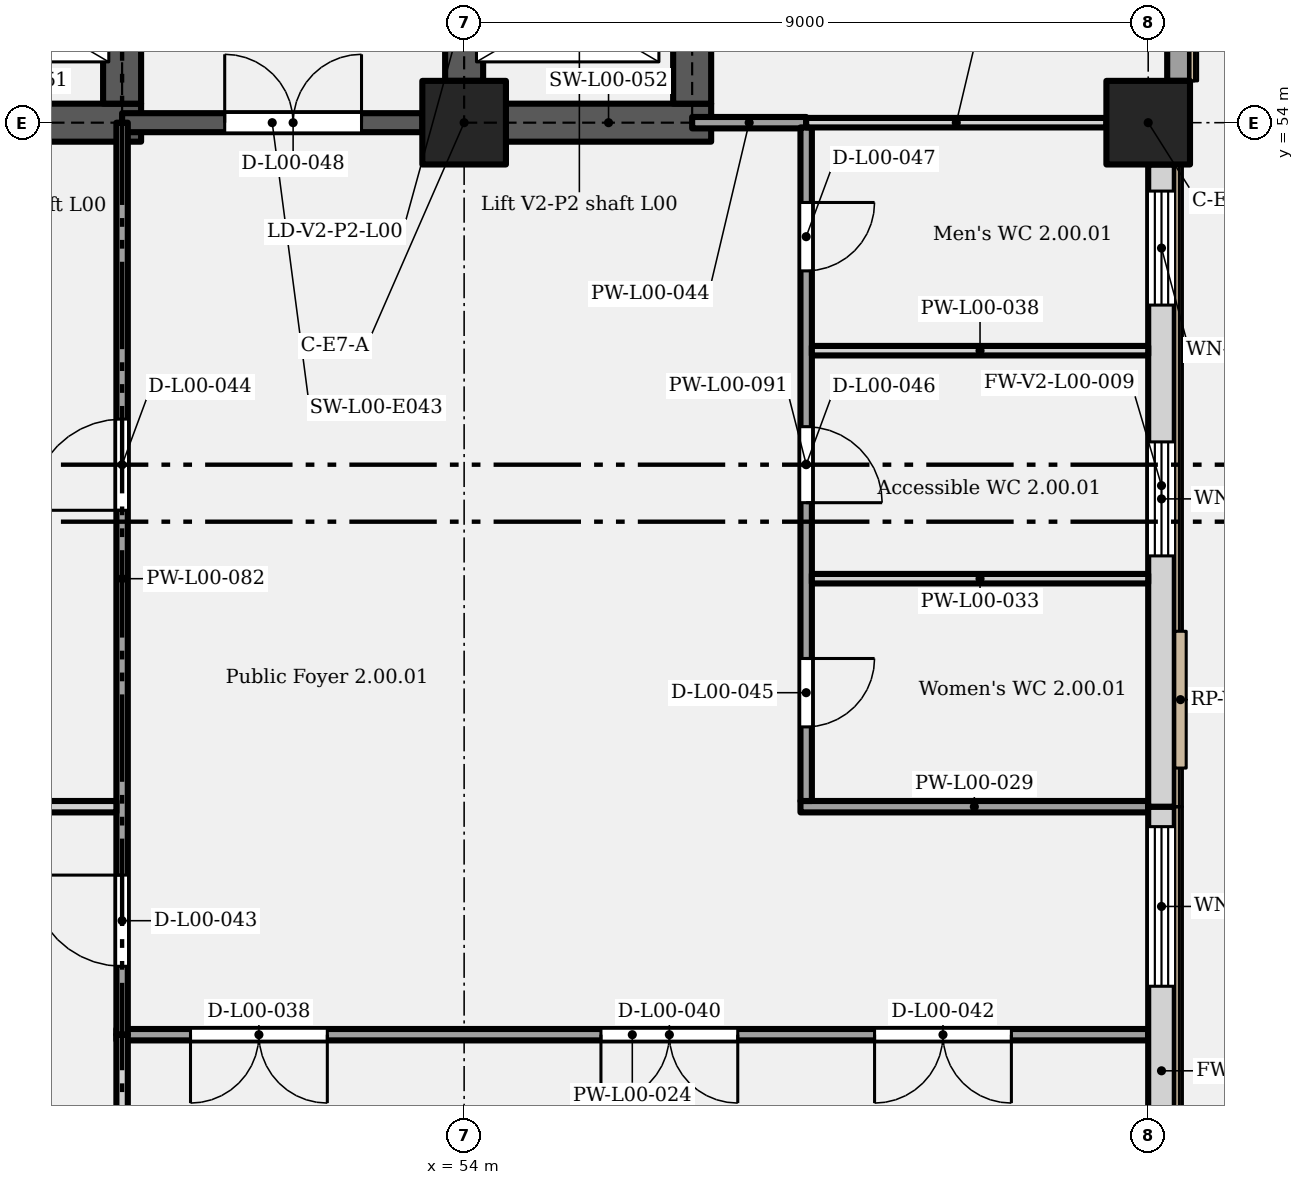
"""IFC4 building model, lengths in metres.
Left out: names, types, materials, properties, quantities, classifications, styles, units other than length and angle.
Written with IfcOpenShell. Run it as: python <this file> out.ifc"""

import sys

from ifc_helpers import new_model, si_unit, direction, frame, frame_2d, origin, origin_2d, place, context, subcontext, project, spatial, rectangle, extrude, element, fill, save


model = new_model("IFC4")
c1 = context("Model", 3, precision=1e-05, world=origin(), true_north=direction((0.0, 1.0)))
c2 = subcontext(c1, "Body", "Model", "MODEL_VIEW")
j1 = project(units=[si_unit("LENGTHUNIT", "METRE"), si_unit("PLANEANGLEUNIT", "RADIAN")], contexts=[c1])
p1 = place(None, origin())
s1 = spatial("IfcSite", under=j1, at=p1, CompositionType="ELEMENT")
p2 = place(p1, origin())
s2 = spatial("IfcBuilding", under=s1, at=p2, CompositionType="ELEMENT")
p3 = place(p2, origin())
s3 = spatial("IfcBuildingStorey", under=s2, at=p3, CompositionType="ELEMENT", Elevation=0.0)
for number, where, z_axis, x_axis in (
    (1, (54.0, 54.0, 0.0), (0.0, 0.0, 1.0), (1.0, 0.0, 0.0)),
    (2, (63.0, 54.0, 0.0), (0.0, 0.0, 1.0), (1.0, 0.0, 0.0)),
):
    element("IfcColumn", number, at=place(p3, frame(where, z_axis=z_axis, x_axis=x_axis)), inside=s3, PredefinedType="COLUMN", context=c2, shape_type="SweptSolid", body=[
        extrude(rectangle(XDim=1.1, YDim=1.1, at=origin_2d()), origin(), (0.0, 0.0, 1.0), 6.6),
    ])
p4 = place(p3, frame((46.25, 54.0, 0.0), z_axis=(0.0, 0.0, 1.0), x_axis=(1.0, 0.0, 0.0)))
e3 = element("IfcWall", 3, at=p4, inside=s3, PredefinedType="SHEAR", context=c2, shape_type="SweptSolid", body=[
    extrude(rectangle(XDim=3.5, YDim=0.5, at=frame_2d((1.75, 0.0))), origin(), (0.0, 0.0, 1.0), 6.3),
])
p5 = place(p3, frame((54.55, 54.0, 0.0), z_axis=(0.0, 0.0, 1.0), x_axis=(1.0, 0.0, 0.0)))
e4 = element("IfcWall", 4, at=p5, inside=s3, PredefinedType="SHEAR", context=c2, shape_type="SweptSolid", body=[
    extrude(rectangle(XDim=2.7, YDim=0.5, at=frame_2d((1.35, 0.0))), origin(), (0.0, 0.0, 1.0), 6.3),
])
p6 = place(p3, frame((49.5, 54.25, 0.0), z_axis=(0.0, 0.0, 1.0), x_axis=(0.0, 1.0, 0.0)))
e5 = element("IfcWall", 5, at=p6, inside=s3, PredefinedType="SHEAR", context=c2, shape_type="SweptSolid", body=[
    extrude(rectangle(XDim=11.5, YDim=0.5, at=frame_2d((5.75, 0.0))), origin(), (0.0, 0.0, 1.0), 6.3),
])
p7 = place(p6, frame((0.7, 0.0, 0.0)))
e6 = element("IfcOpeningElement", 6, at=p7, cuts=e5, PredefinedType="OPENING", context=c2, shape_type="SweptSolid", body=[
    extrude(rectangle(XDim=1.1, YDim=2.1, at=frame_2d((0.55, 1.05))), frame((0.0, 0.26, 0.0), z_axis=(0.0, -1.0, 0.0), x_axis=(1.0, 0.0, 0.0)), (0.0, 0.0, 1.0), 0.52),
])
p8 = place(p6, frame((4.35, 0.0, 0.0), z_axis=(0.0, 0.0, 1.0), x_axis=(-1.0, 0.0, 0.0)))
e7 = element("IfcOpeningElement", 7, at=p8, cuts=e5, PredefinedType="OPENING", context=c2, shape_type="SweptSolid", body=[
    extrude(rectangle(XDim=1.2, YDim=2.1, at=frame_2d((0.6, 1.05))), frame((0.0, 0.26, 0.0), z_axis=(0.0, -1.0, 0.0), x_axis=(1.0, 0.0, 0.0)), (0.0, 0.0, 1.0), 0.52),
])
p9 = place(p3, frame((57.0, 54.25, 0.0), z_axis=(0.0, 0.0, 1.0), x_axis=(0.0, 1.0, 0.0)))
e8 = element("IfcWall", 8, at=p9, inside=s3, PredefinedType="SHEAR", context=c2, shape_type="SweptSolid", body=[
    extrude(rectangle(XDim=2.5, YDim=0.5, at=frame_2d((1.25, 0.0))), origin(), (0.0, 0.0, 1.0), 6.3),
])
p10 = place(p3, frame((54.0, 54.55, 0.0), z_axis=(0.0, 0.0, 1.0), x_axis=(0.0, 1.0, 0.0)))
e9 = element("IfcWall", 9, at=p10, inside=s3, PredefinedType="SHEAR", context=c2, shape_type="SweptSolid", body=[
    extrude(rectangle(XDim=11.0, YDim=0.5, at=frame_2d((5.5, 0.0))), origin(), (0.0, 0.0, 1.0), 6.3),
])
p11 = place(p10, frame((0.4, 0.0, 0.0)))
e10 = element("IfcOpeningElement", 10, at=p11, cuts=e9, PredefinedType="OPENING", context=c2, shape_type="SweptSolid", body=[
    extrude(rectangle(XDim=1.1, YDim=2.1, at=frame_2d((0.55, 1.05))), frame((0.0, 0.26, 0.0), z_axis=(0.0, -1.0, 0.0), x_axis=(1.0, 0.0, 0.0)), (0.0, 0.0, 1.0), 0.52),
])
p12 = place(p10, frame((2.85, 0.0, 0.0)))
e11 = element("IfcOpeningElement", 11, at=p12, cuts=e9, PredefinedType="OPENING", context=c2, shape_type="SweptSolid", body=[
    extrude(rectangle(XDim=1.2, YDim=2.1, at=frame_2d((0.6, 1.05))), frame((0.0, 0.26, 0.0), z_axis=(0.0, -1.0, 0.0), x_axis=(1.0, 0.0, 0.0)), (0.0, 0.0, 1.0), 0.52),
])
p13 = place(p3, frame((63.175, 38.05, 0.0), z_axis=(0.0, 0.0, 1.0), x_axis=(0.0, 1.0, 0.0)))
e12 = element("IfcWall", 12, at=p13, inside=s3, PredefinedType="SOLIDWALL", context=c2, shape_type="SweptSolid", body=[
    extrude(rectangle(XDim=6.95, YDim=0.35, at=frame_2d((3.475, 0.0))), origin(), (0.0, 0.0, 1.0), 6.3),
])
p14 = place(p13, frame((0.462, 0.0, 0.9)))
e13 = element("IfcOpeningElement", 13, at=p14, cuts=e12, PredefinedType="OPENING", context=c2, shape_type="SweptSolid", body=[
    extrude(rectangle(XDim=2.1, YDim=3.6, at=frame_2d((1.05, 1.8))), frame((0.0, 0.185, 0.0), z_axis=(0.0, -1.0, 0.0), x_axis=(1.0, 0.0, 0.0)), (0.0, 0.0, 1.0), 0.37),
])
p15 = place(p13, frame((4.587, 0.0, 0.9)))
e14 = element("IfcOpeningElement", 14, at=p15, cuts=e12, PredefinedType="OPENING", context=c2, shape_type="SweptSolid", body=[
    extrude(rectangle(XDim=2.1, YDim=3.6, at=frame_2d((1.05, 1.8))), frame((0.0, 0.185, 0.0), z_axis=(0.0, -1.0, 0.0), x_axis=(1.0, 0.0, 0.0)), (0.0, 0.0, 1.0), 0.37),
])
p16 = place(p3, frame((63.175, 45.0, 0.0), z_axis=(0.0, 0.0, 1.0), x_axis=(0.0, 1.0, 0.0)))
e15 = element("IfcWall", 15, at=p16, inside=s3, PredefinedType="SOLIDWALL", context=c2, shape_type="SweptSolid", body=[
    extrude(rectangle(XDim=8.45, YDim=0.35, at=frame_2d((4.225, 0.0))), origin(), (0.0, 0.0, 1.0), 6.3),
])
p17 = place(p16, frame((3.3, 0.0, 1.05)))
e16 = element("IfcOpeningElement", 16, at=p17, cuts=e15, PredefinedType="OPENING", context=c2, shape_type="SweptSolid", body=[
    extrude(rectangle(XDim=1.5, YDim=3.9, at=frame_2d((0.75, 1.95))), frame((0.0, 0.185, 0.0), z_axis=(0.0, -1.0, 0.0), x_axis=(1.0, 0.0, 0.0)), (0.0, 0.0, 1.0), 0.37),
])
p18 = place(p16, frame((6.6, 0.0, 1.05)))
e17 = element("IfcOpeningElement", 17, at=p18, cuts=e15, PredefinedType="OPENING", context=c2, shape_type="SweptSolid", body=[
    extrude(rectangle(XDim=1.5, YDim=3.9, at=frame_2d((0.75, 1.95))), frame((0.0, 0.185, 0.0), z_axis=(0.0, -1.0, 0.0), x_axis=(1.0, 0.0, 0.0)), (0.0, 0.0, 1.0), 0.37),
])
p19 = place(p3, frame((63.4, 54.55, 0.0), z_axis=(0.0, 0.0, 1.0), x_axis=(0.0, 1.0, 0.0)))
e18 = element("IfcWall", 18, at=p19, inside=s3, PredefinedType="SOLIDWALL", context=c2, shape_type="SweptSolid", body=[
    extrude(rectangle(XDim=2.45, YDim=0.3, at=frame_2d((1.225, 0.0))), origin(), (0.0, 0.0, 1.0), 6.3),
])
p20 = place(p19, frame((0.425, 0.0, 1.05)))
e19 = element("IfcOpeningElement", 19, at=p20, cuts=e18, PredefinedType="OPENING", context=c2, shape_type="SweptSolid", body=[
    extrude(rectangle(XDim=1.05, YDim=2.4, at=frame_2d((0.525, 1.2))), frame((0.0, 0.16, 0.0), z_axis=(0.0, -1.0, 0.0), x_axis=(1.0, 0.0, 0.0)), (0.0, 0.0, 1.0), 0.32),
])
p21 = place(p3, frame((49.425, 42.0, 0.0), z_axis=(0.0, 0.0, 1.0), x_axis=(1.0, 0.0, 0.0)))
e20 = element("IfcWall", 20, at=p21, inside=s3, PredefinedType="PARTITIONING", context=c2, shape_type="SweptSolid", body=[
    extrude(rectangle(XDim=13.575, YDim=0.15, at=frame_2d((6.788, 0.0))), origin(), (0.0, 0.0, 1.0), 6.3),
])
p22 = place(p21, frame((2.775, 0.0, 0.0), z_axis=(0.0, 0.0, 1.0), x_axis=(-1.0, 0.0, 0.0)))
e21 = element("IfcOpeningElement", 21, at=p22, cuts=e20, PredefinedType="OPENING", context=c2, shape_type="SweptSolid", body=[
    extrude(rectangle(XDim=1.8, YDim=2.1, at=frame_2d((0.9, 1.05))), frame((0.0, 0.085, 0.0), z_axis=(0.0, -1.0, 0.0), x_axis=(1.0, 0.0, 0.0)), (0.0, 0.0, 1.0), 0.17),
])
p23 = place(p21, frame((8.175, 0.0, 0.0), z_axis=(0.0, 0.0, 1.0), x_axis=(-1.0, 0.0, 0.0)))
e22 = element("IfcOpeningElement", 22, at=p23, cuts=e20, PredefinedType="OPENING", context=c2, shape_type="SweptSolid", body=[
    extrude(rectangle(XDim=1.8, YDim=2.1, at=frame_2d((0.9, 1.05))), frame((0.0, 0.085, 0.0), z_axis=(0.0, -1.0, 0.0), x_axis=(1.0, 0.0, 0.0)), (0.0, 0.0, 1.0), 0.17),
])
p24 = place(p21, frame((11.775, 0.0, 0.0), z_axis=(0.0, 0.0, 1.0), x_axis=(-1.0, 0.0, 0.0)))
e23 = element("IfcOpeningElement", 23, at=p24, cuts=e20, PredefinedType="OPENING", context=c2, shape_type="SweptSolid", body=[
    extrude(rectangle(XDim=1.8, YDim=2.1, at=frame_2d((0.9, 1.05))), frame((0.0, 0.085, 0.0), z_axis=(0.0, -1.0, 0.0), x_axis=(1.0, 0.0, 0.0)), (0.0, 0.0, 1.0), 0.17),
])
p25 = place(p3, frame((40.65, 45.0, 0.0), z_axis=(0.0, 0.0, 1.0), x_axis=(1.0, 0.0, 0.0)))
e24 = element("IfcWall", 24, at=p25, inside=s3, PredefinedType="PARTITIONING", context=c2, shape_type="SweptSolid", body=[
    extrude(rectangle(XDim=8.775, YDim=0.15, at=frame_2d((4.388, 0.0))), origin(), (0.0, 0.0, 1.0), 6.3),
])
p26 = place(p3, frame((58.425, 45.0, 0.0), z_axis=(0.0, 0.0, 1.0), x_axis=(1.0, 0.0, 0.0)))
e25 = element("IfcWall", 25, at=p26, inside=s3, PredefinedType="PARTITIONING", context=c2, shape_type="SweptSolid", body=[
    extrude(rectangle(XDim=4.575, YDim=0.15, at=frame_2d((2.288, 0.0))), origin(), (0.0, 0.0, 1.0), 6.3),
])
for number, where, z_axis, x_axis in (
    (26, (58.575, 48.0, 0.0), (0.0, 0.0, 1.0), (1.0, 0.0, 0.0)),
    (27, (58.575, 51.0, 0.0), (0.0, 0.0, 1.0), (1.0, 0.0, 0.0)),
):
    element("IfcWall", number, at=place(p3, frame(where, z_axis=z_axis, x_axis=x_axis)), inside=s3, PredefinedType="PARTITIONING", context=c2, shape_type="SweptSolid", body=[
        extrude(rectangle(XDim=4.425, YDim=0.125, at=frame_2d((2.212, 0.0))), origin(), (0.0, 0.0, 1.0), 6.3),
    ])
p27 = place(p3, frame((49.5, 54.0, 0.0), z_axis=(0.0, 0.0, 1.0), x_axis=(1.0, 0.0, 0.0)))
e28 = element("IfcWall", 28, at=p27, inside=s3, PredefinedType="SHEAR", context=c2, shape_type="SweptSolid", body=[
    extrude(rectangle(XDim=3.95, YDim=0.25, at=frame_2d((1.975, 0.0))), origin(), (0.0, 0.0, 1.0), 6.3),
])
p28 = place(p27, frame((1.35, 0.0, 0.0)))
e29 = element("IfcOpeningElement", 29, at=p28, cuts=e28, PredefinedType="OPENING", context=c2, shape_type="SweptSolid", body=[
    extrude(rectangle(XDim=1.8, YDim=2.1, at=frame_2d((0.9, 1.05))), frame((0.0, 0.135, 0.0), z_axis=(0.0, -1.0, 0.0), x_axis=(1.0, 0.0, 0.0)), (0.0, 0.0, 1.0), 0.27),
])
p29 = place(p3, frame((57.0, 54.0, 0.0), z_axis=(0.0, 0.0, 1.0), x_axis=(1.0, 0.0, 0.0)))
e30 = element("IfcWall", 30, at=p29, inside=s3, PredefinedType="PARTITIONING", context=c2, shape_type="SweptSolid", body=[
    extrude(rectangle(XDim=1.5, YDim=0.15, at=frame_2d((0.75, 0.0))), origin(), (0.0, 0.0, 1.0), 5.55),
])
p30 = place(p3, frame((58.5, 54.0, 0.0), z_axis=(0.0, 0.0, 1.0), x_axis=(1.0, 0.0, 0.0)))
e31 = element("IfcWall", 31, at=p30, inside=s3, PredefinedType="PARTITIONING", context=c2, shape_type="SweptSolid", body=[
    extrude(rectangle(XDim=3.95, YDim=0.125, at=frame_2d((1.975, 0.0))), origin(), (0.0, 0.0, 1.0), 5.55),
])
p31 = place(p3, frame((49.5, 37.5, 0.0), z_axis=(0.0, 0.0, 1.0), x_axis=(0.0, 1.0, 0.0)))
e32 = element("IfcWall", 32, at=p31, inside=s3, PredefinedType="PARTITIONING", context=c2, shape_type="SweptSolid", body=[
    extrude(rectangle(XDim=4.5, YDim=0.15, at=frame_2d((2.25, 0.0))), origin(), (0.0, 0.0, 1.0), 6.3),
])
p32 = place(p3, frame((49.5, 42.0, 0.0), z_axis=(0.0, 0.0, 1.0), x_axis=(0.0, 1.0, 0.0)))
e33 = element("IfcWall", 33, at=p32, inside=s3, PredefinedType="PARTITIONING", context=c2, shape_type="SweptSolid", body=[
    extrude(rectangle(XDim=12.0, YDim=0.15, at=frame_2d((6.0, 0.0))), origin(), (0.0, 0.0, 1.0), 6.3),
])
p33 = place(p32, frame((0.9, 0.0, 0.0)))
e34 = element("IfcOpeningElement", 34, at=p33, cuts=e33, PredefinedType="OPENING", context=c2, shape_type="SweptSolid", body=[
    extrude(rectangle(XDim=1.2, YDim=2.1, at=frame_2d((0.6, 1.05))), frame((0.0, 0.085, 0.0), z_axis=(0.0, -1.0, 0.0), x_axis=(1.0, 0.0, 0.0)), (0.0, 0.0, 1.0), 0.17),
])
p34 = place(p32, frame((6.9, 0.0, 0.0)))
e35 = element("IfcOpeningElement", 35, at=p34, cuts=e33, PredefinedType="OPENING", context=c2, shape_type="SweptSolid", body=[
    extrude(rectangle(XDim=1.2, YDim=2.1, at=frame_2d((0.6, 1.05))), frame((0.0, 0.085, 0.0), z_axis=(0.0, -1.0, 0.0), x_axis=(1.0, 0.0, 0.0)), (0.0, 0.0, 1.0), 0.17),
])
p35 = place(p3, frame((58.5, 45.075, 0.0), z_axis=(0.0, 0.0, 1.0), x_axis=(0.0, 1.0, 0.0)))
e36 = element("IfcWall", 36, at=p35, inside=s3, PredefinedType="PARTITIONING", context=c2, shape_type="SweptSolid", body=[
    extrude(rectangle(XDim=8.863, YDim=0.15, at=frame_2d((4.431, 0.0))), origin(), (0.0, 0.0, 1.0), 6.3),
])
p36 = place(p35, frame((1.875, 0.0, 0.0), z_axis=(0.0, 0.0, 1.0), x_axis=(-1.0, 0.0, 0.0)))
e37 = element("IfcOpeningElement", 37, at=p36, cuts=e36, PredefinedType="OPENING", context=c2, shape_type="SweptSolid", body=[
    extrude(rectangle(XDim=0.9, YDim=2.1, at=frame_2d((0.45, 1.05))), frame((0.0, 0.085, 0.0), z_axis=(0.0, -1.0, 0.0), x_axis=(1.0, 0.0, 0.0)), (0.0, 0.0, 1.0), 0.17),
])
p37 = place(p35, frame((4.925, 0.0, 0.0), z_axis=(0.0, 0.0, 1.0), x_axis=(-1.0, 0.0, 0.0)))
e38 = element("IfcOpeningElement", 38, at=p37, cuts=e36, PredefinedType="OPENING", context=c2, shape_type="SweptSolid", body=[
    extrude(rectangle(XDim=1.0, YDim=2.1, at=frame_2d((0.5, 1.05))), frame((0.0, 0.085, 0.0), z_axis=(0.0, -1.0, 0.0), x_axis=(1.0, 0.0, 0.0)), (0.0, 0.0, 1.0), 0.17),
])
p38 = place(p35, frame((7.875, 0.0, 0.0), z_axis=(0.0, 0.0, 1.0), x_axis=(-1.0, 0.0, 0.0)))
e39 = element("IfcOpeningElement", 39, at=p38, cuts=e36, PredefinedType="OPENING", context=c2, shape_type="SweptSolid", body=[
    extrude(rectangle(XDim=0.9, YDim=2.1, at=frame_2d((0.45, 1.05))), frame((0.0, 0.085, 0.0), z_axis=(0.0, -1.0, 0.0), x_axis=(1.0, 0.0, 0.0)), (0.0, 0.0, 1.0), 0.17),
])
p39 = place(p15, origin())
e40 = element("IfcWindow", 40, at=p39, inside=s3, PartitioningType="SINGLE_PANEL", PredefinedType="WINDOW", context=c2, shape_type="SweptSolid", body=[
    extrude(rectangle(XDim=2.1, YDim=3.6, at=frame_2d((1.05, 1.8))), frame((0.0, 0.03, 0.0), z_axis=(0.0, -1.0, 0.0), x_axis=(1.0, 0.0, 0.0)), (0.0, 0.0, 1.0), 0.06),
])
fill(e14, e40)
p40 = place(p17, origin())
e41 = element("IfcWindow", 41, at=p40, inside=s3, PartitioningType="SINGLE_PANEL", PredefinedType="WINDOW", context=c2, shape_type="SweptSolid", body=[
    extrude(rectangle(XDim=1.5, YDim=3.9, at=frame_2d((0.75, 1.95))), frame((0.0, 0.03, 0.0), z_axis=(0.0, -1.0, 0.0), x_axis=(1.0, 0.0, 0.0)), (0.0, 0.0, 1.0), 0.06),
])
fill(e16, e41)
p41 = place(p18, origin())
e42 = element("IfcWindow", 42, at=p41, inside=s3, PartitioningType="SINGLE_PANEL", PredefinedType="WINDOW", context=c2, shape_type="SweptSolid", body=[
    extrude(rectangle(XDim=1.5, YDim=3.9, at=frame_2d((0.75, 1.95))), frame((0.0, 0.03, 0.0), z_axis=(0.0, -1.0, 0.0), x_axis=(1.0, 0.0, 0.0)), (0.0, 0.0, 1.0), 0.06),
])
fill(e17, e42)
p42 = place(p22, origin())
e43 = element("IfcDoor", 43, at=p42, inside=s3, OperationType="DOUBLE_DOOR_SINGLE_SWING", PredefinedType="DOOR", context=c2, shape_type="SweptSolid", body=[
    extrude(rectangle(XDim=1.8, YDim=2.1, at=frame_2d((0.9, 1.05))), frame((0.0, 0.025, 0.0), z_axis=(0.0, -1.0, 0.0), x_axis=(1.0, 0.0, 0.0)), (0.0, 0.0, 1.0), 0.05),
])
fill(e21, e43)
p43 = place(p23, origin())
e44 = element("IfcDoor", 44, at=p43, inside=s3, OperationType="DOUBLE_DOOR_SINGLE_SWING", PredefinedType="DOOR", context=c2, shape_type="SweptSolid", body=[
    extrude(rectangle(XDim=1.8, YDim=2.1, at=frame_2d((0.9, 1.05))), frame((0.0, 0.025, 0.0), z_axis=(0.0, -1.0, 0.0), x_axis=(1.0, 0.0, 0.0)), (0.0, 0.0, 1.0), 0.05),
])
fill(e22, e44)
p44 = place(p24, origin())
e45 = element("IfcDoor", 45, at=p44, inside=s3, OperationType="DOUBLE_DOOR_SINGLE_SWING", PredefinedType="DOOR", context=c2, shape_type="SweptSolid", body=[
    extrude(rectangle(XDim=1.8, YDim=2.1, at=frame_2d((0.9, 1.05))), frame((0.0, 0.025, 0.0), z_axis=(0.0, -1.0, 0.0), x_axis=(1.0, 0.0, 0.0)), (0.0, 0.0, 1.0), 0.05),
])
fill(e23, e45)
p45 = place(p33, origin())
e46 = element("IfcDoor", 46, at=p45, inside=s3, OperationType="SINGLE_SWING_RIGHT", PredefinedType="DOOR", context=c2, shape_type="SweptSolid", body=[
    extrude(rectangle(XDim=1.2, YDim=2.1, at=frame_2d((0.6, 1.05))), frame((0.0, 0.025, 0.0), z_axis=(0.0, -1.0, 0.0), x_axis=(1.0, 0.0, 0.0)), (0.0, 0.0, 1.0), 0.05),
])
fill(e34, e46)
p46 = place(p34, origin())
e47 = element("IfcDoor", 47, at=p46, inside=s3, OperationType="SINGLE_SWING_LEFT", PredefinedType="DOOR", context=c2, shape_type="SweptSolid", body=[
    extrude(rectangle(XDim=1.2, YDim=2.1, at=frame_2d((0.6, 1.05))), frame((0.0, 0.025, 0.0), z_axis=(0.0, -1.0, 0.0), x_axis=(1.0, 0.0, 0.0)), (0.0, 0.0, 1.0), 0.05),
])
fill(e35, e47)
p47 = place(p36, origin())
e48 = element("IfcDoor", 48, at=p47, inside=s3, OperationType="SINGLE_SWING_LEFT", PredefinedType="DOOR", context=c2, shape_type="SweptSolid", body=[
    extrude(rectangle(XDim=0.9, YDim=2.1, at=frame_2d((0.45, 1.05))), frame((0.0, 0.025, 0.0), z_axis=(0.0, -1.0, 0.0), x_axis=(1.0, 0.0, 0.0)), (0.0, 0.0, 1.0), 0.05),
])
fill(e37, e48)
p48 = place(p37, origin())
e49 = element("IfcDoor", 49, at=p48, inside=s3, OperationType="SINGLE_SWING_RIGHT", PredefinedType="DOOR", context=c2, shape_type="SweptSolid", body=[
    extrude(rectangle(XDim=1.0, YDim=2.1, at=frame_2d((0.5, 1.05))), frame((0.0, 0.025, 0.0), z_axis=(0.0, -1.0, 0.0), x_axis=(1.0, 0.0, 0.0)), (0.0, 0.0, 1.0), 0.05),
])
fill(e38, e49)
p49 = place(p38, origin())
e50 = element("IfcDoor", 50, at=p49, inside=s3, OperationType="SINGLE_SWING_LEFT", PredefinedType="DOOR", context=c2, shape_type="SweptSolid", body=[
    extrude(rectangle(XDim=0.9, YDim=2.1, at=frame_2d((0.45, 1.05))), frame((0.0, 0.025, 0.0), z_axis=(0.0, -1.0, 0.0), x_axis=(1.0, 0.0, 0.0)), (0.0, 0.0, 1.0), 0.05),
])
fill(e39, e50)
p50 = place(p28, origin())
e51 = element("IfcDoor", 51, at=p50, inside=s3, OperationType="DOUBLE_DOOR_SINGLE_SWING", PredefinedType="DOOR", context=c2, shape_type="SweptSolid", body=[
    extrude(rectangle(XDim=1.8, YDim=2.1, at=frame_2d((0.9, 1.05))), frame((0.0, 0.025, 0.0), z_axis=(0.0, -1.0, 0.0), x_axis=(1.0, 0.0, 0.0)), (0.0, 0.0, 1.0), 0.05),
])
fill(e29, e51)
save(model, sys.argv[1])
